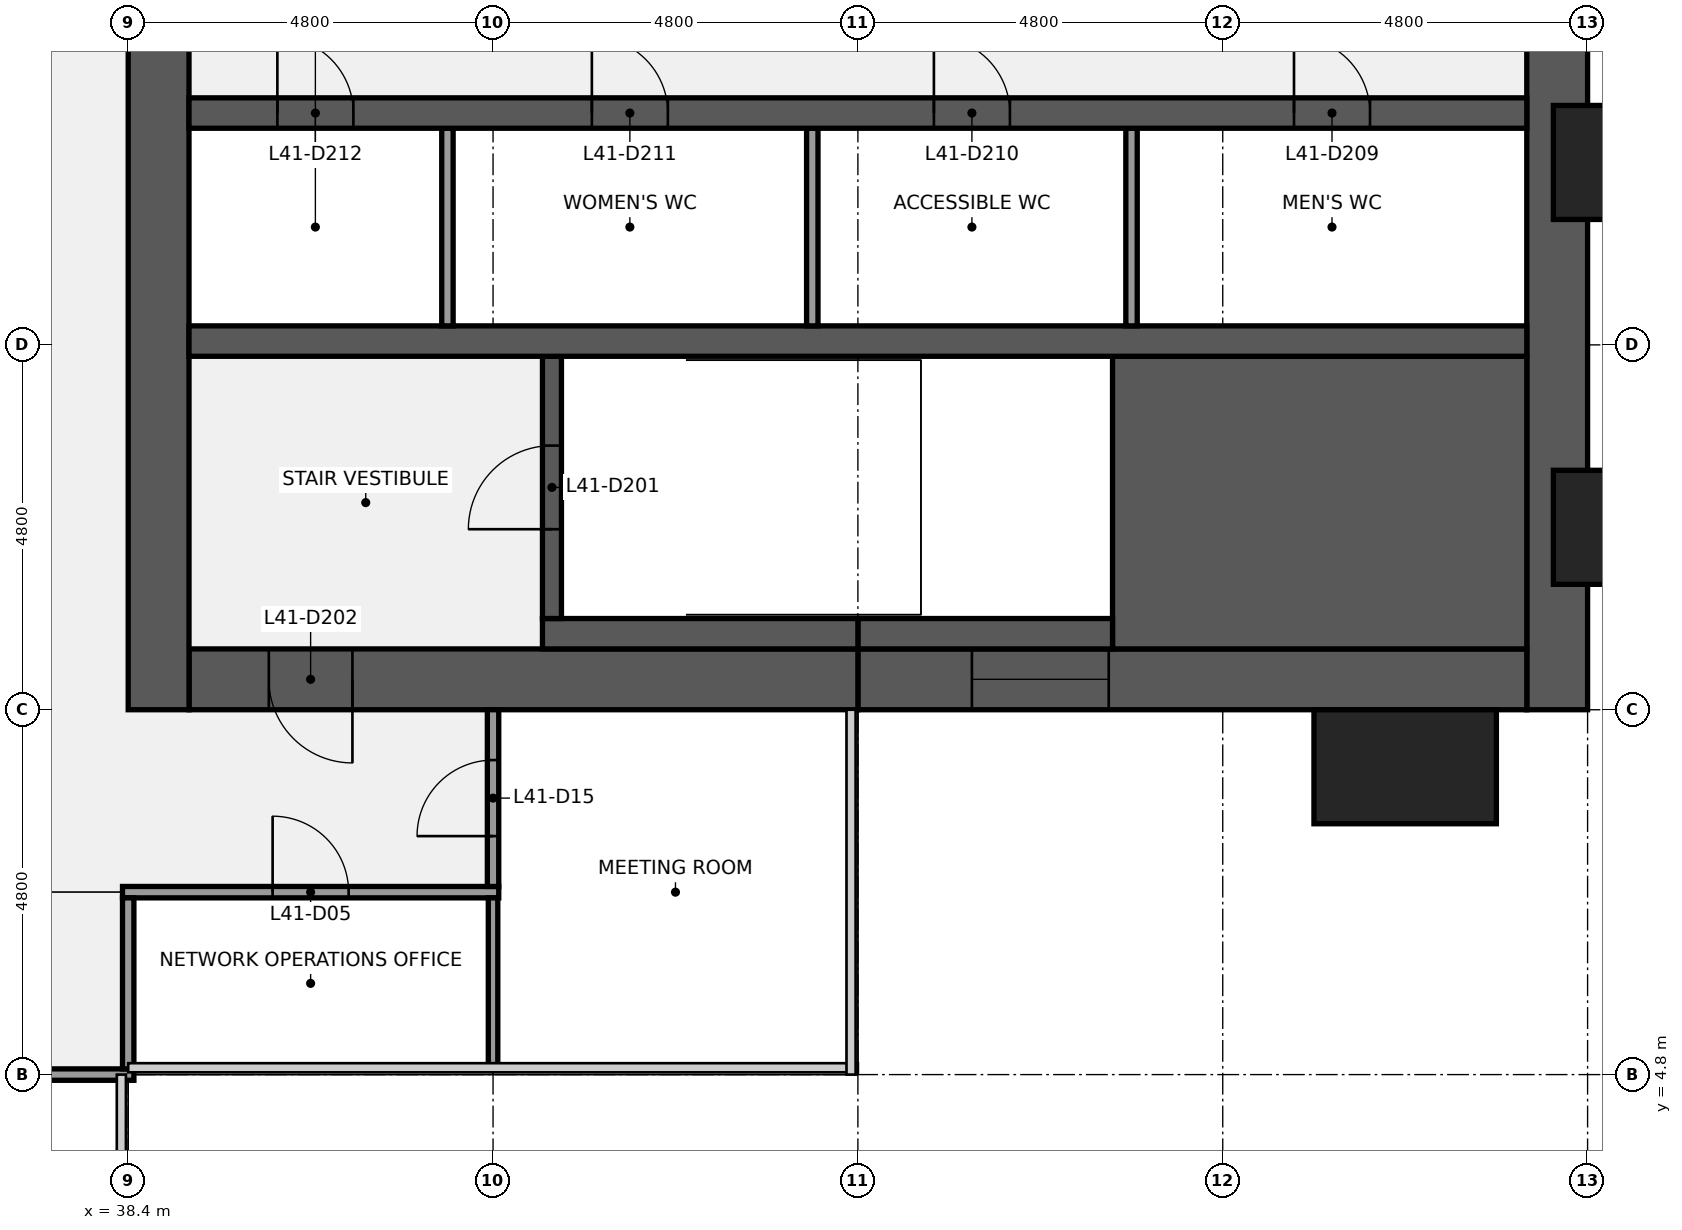
"""IFC4 building model, lengths in metres.
Left out: names, types, materials, properties, quantities, classifications, styles, units other than length and angle.
Written with IfcOpenShell. Run it as: python <this file> out.ifc"""

import sys

from ifc_helpers import new_model, si_unit, direction, frame, frame_2d, origin, origin_2d, place, context, subcontext, project, spatial, rectangle, extrude, element, fill, save


model = new_model("IFC4")
c1 = context("Model", 3, precision=1e-05, world=origin(), true_north=direction((0.0, 1.0)))
c2 = subcontext(c1, "Body", "Model", "MODEL_VIEW")
j1 = project(units=[si_unit("LENGTHUNIT", "METRE"), si_unit("PLANEANGLEUNIT", "RADIAN")], contexts=[c1])
p1 = place(None, origin())
s1 = spatial("IfcSite", under=j1, at=p1, CompositionType="ELEMENT")
p2 = place(p1, origin())
s2 = spatial("IfcBuilding", under=s1, at=p2, CompositionType="ELEMENT")
p3 = place(p2, frame((0.0, 0.0, 193.2)))
s3 = spatial("IfcBuildingStorey", under=s2, at=p3, CompositionType="ELEMENT", Elevation=193.2)
p4 = place(p3, frame((57.2, 38.4, 0.0), z_axis=(0.0, 0.0, 1.0), x_axis=(0.0, -1.0, 0.0)))
e1 = element("IfcWall", 1, at=p4, inside=s3, PredefinedType="SHEAR", context=c2, shape_type="SweptSolid", body=[
    extrude(rectangle(XDim=28.8, YDim=0.8, at=frame_2d((14.4, 0.0))), origin(), (0.0, 0.0, 1.0), 3.84),
])
p5 = place(p4, frame((18.45, 0.0, 0.9)))
e2 = element("IfcOpeningElement", 2, at=p5, cuts=e1, PredefinedType="OPENING", context=c2, shape_type="SweptSolid", body=[
    extrude(rectangle(XDim=1.5, YDim=1.5, at=frame_2d((0.75, 0.75))), frame((0.0, 0.41, 0.0), z_axis=(0.0, -1.0, 0.0), x_axis=(1.0, 0.0, 0.0)), (0.0, 0.0, 1.0), 0.82),
])
p6 = place(p4, frame((8.85, 0.0, 0.9)))
e3 = element("IfcOpeningElement", 3, at=p6, cuts=e1, PredefinedType="OPENING", context=c2, shape_type="SweptSolid", body=[
    extrude(rectangle(XDim=1.5, YDim=1.5, at=frame_2d((0.75, 0.75))), frame((0.0, 0.41, 0.0), z_axis=(0.0, -1.0, 0.0), x_axis=(1.0, 0.0, 0.0)), (0.0, 0.0, 1.0), 0.82),
])
p7 = place(p3, frame((56.8, 10.0, 0.0), z_axis=(0.0, 0.0, 1.0), x_axis=(-1.0, 0.0, 0.0)))
e4 = element("IfcWall", 4, at=p7, inside=s3, PredefinedType="SHEAR", context=c2, shape_type="SweptSolid", body=[
    extrude(rectangle(XDim=8.8, YDim=0.8, at=frame_2d((4.4, 0.0))), origin(), (0.0, 0.0, 1.0), 3.84),
])
p8 = place(p7, frame((5.5, 0.0, 0.9)))
e5 = element("IfcOpeningElement", 5, at=p8, cuts=e4, PredefinedType="OPENING", context=c2, shape_type="SweptSolid", body=[
    extrude(rectangle(XDim=1.8, YDim=1.5, at=frame_2d((0.9, 0.75))), frame((0.0, 0.41, 0.0), z_axis=(0.0, -1.0, 0.0), x_axis=(1.0, 0.0, 0.0)), (0.0, 0.0, 1.0), 0.82),
])
p9 = place(p3, frame((48.0, 10.0, 0.0), z_axis=(0.0, 0.0, 1.0), x_axis=(-1.0, 0.0, 0.0)))
e6 = element("IfcWall", 6, at=p9, inside=s3, PredefinedType="SHEAR", context=c2, shape_type="SweptSolid", body=[
    extrude(rectangle(XDim=8.8, YDim=0.8, at=frame_2d((4.4, 0.0))), origin(), (0.0, 0.0, 1.0), 3.84),
])
p10 = place(p9, frame((6.65, 0.0, 0.0)))
e7 = element("IfcOpeningElement", 7, at=p10, cuts=e6, PredefinedType="OPENING", context=c2, shape_type="SweptSolid", body=[
    extrude(rectangle(XDim=1.1, YDim=2.1, at=frame_2d((0.55, 1.05))), frame((0.0, 0.41, 0.0), z_axis=(0.0, -1.0, 0.0), x_axis=(1.0, 0.0, 0.0)), (0.0, 0.0, 1.0), 0.82),
])
p11 = place(p3, frame((38.8, 9.6, 0.0), z_axis=(0.0, 0.0, 1.0), x_axis=(0.0, 1.0, 0.0)))
e8 = element("IfcWall", 8, at=p11, inside=s3, PredefinedType="SHEAR", context=c2, shape_type="SweptSolid", body=[
    extrude(rectangle(XDim=28.8, YDim=0.8, at=frame_2d((14.4, 0.0))), origin(), (0.0, 0.0, 1.0), 3.84),
])
p12 = place(p11, frame((8.7, 0.0, 0.0)))
e9 = element("IfcOpeningElement", 9, at=p12, cuts=e8, PredefinedType="OPENING", context=c2, shape_type="SweptSolid", body=[
    extrude(rectangle(XDim=1.8, YDim=2.1, at=frame_2d((0.9, 1.05))), frame((0.0, 0.41, 0.0), z_axis=(0.0, -1.0, 0.0), x_axis=(1.0, 0.0, 0.0)), (0.0, 0.0, 1.0), 0.82),
])
p13 = place(p11, frame((18.3, 0.0, 0.0)))
e10 = element("IfcOpeningElement", 10, at=p13, cuts=e8, PredefinedType="OPENING", context=c2, shape_type="SweptSolid", body=[
    extrude(rectangle(XDim=1.8, YDim=2.1, at=frame_2d((0.9, 1.05))), frame((0.0, 0.41, 0.0), z_axis=(0.0, -1.0, 0.0), x_axis=(1.0, 0.0, 0.0)), (0.0, 0.0, 1.0), 0.82),
])
p14 = place(p3, frame((51.35, 12.325, 0.0), z_axis=(0.0, 0.0, 1.0), x_axis=(1.0, 0.0, 0.0)))
e11 = element("IfcWall", 11, at=p14, inside=s3, PredefinedType="SHEAR", context=c2, shape_type="SweptSolid", body=[
    extrude(rectangle(XDim=5.45, YDim=3.85, at=frame_2d((2.725, 0.0))), origin(), (0.0, 0.0, 1.0), 3.84),
])
p15 = place(p3, frame((48.0, 10.6, 0.0), z_axis=(0.0, 0.0, 1.0), x_axis=(1.0, 0.0, 0.0)))
e12 = element("IfcWall", 12, at=p15, inside=s3, PredefinedType="SHEAR", context=c2, shape_type="SweptSolid", body=[
    extrude(rectangle(XDim=3.35, YDim=0.4, at=frame_2d((1.675, 0.0))), origin(), (0.0, 0.0, 1.0), 3.84),
])
p16 = place(p3, frame((43.85, 10.6, 0.0), z_axis=(0.0, 0.0, 1.0), x_axis=(1.0, 0.0, 0.0)))
e13 = element("IfcWall", 13, at=p16, inside=s3, PredefinedType="SHEAR", context=c2, shape_type="SweptSolid", body=[
    extrude(rectangle(XDim=4.15, YDim=0.4, at=frame_2d((2.075, 0.0))), origin(), (0.0, 0.0, 1.0), 3.84),
])
p17 = place(p3, frame((43.975, 10.8, 0.0), z_axis=(0.0, 0.0, 1.0), x_axis=(0.0, 1.0, 0.0)))
e14 = element("IfcWall", 14, at=p17, inside=s3, PredefinedType="SHEAR", context=c2, shape_type="SweptSolid", body=[
    extrude(rectangle(XDim=3.45, YDim=0.25, at=frame_2d((1.725, 0.0))), origin(), (0.0, 0.0, 1.0), 3.84),
])
p18 = place(p17, frame((1.175, 0.0, 0.0)))
e15 = element("IfcOpeningElement", 15, at=p18, cuts=e14, PredefinedType="OPENING", context=c2, shape_type="SweptSolid", body=[
    extrude(rectangle(XDim=1.1, YDim=2.1, at=frame_2d((0.55, 1.05))), frame((0.0, 0.135, 0.0), z_axis=(0.0, -1.0, 0.0), x_axis=(1.0, 0.0, 0.0)), (0.0, 0.0, 1.0), 0.27),
])
p19 = place(p3, frame((39.2, 14.45, 0.0), z_axis=(0.0, 0.0, 1.0), x_axis=(1.0, 0.0, 0.0)))
e16 = element("IfcWall", 16, at=p19, inside=s3, PredefinedType="SHEAR", context=c2, shape_type="SweptSolid", body=[
    extrude(rectangle(XDim=17.6, YDim=0.4, at=frame_2d((8.8, 0.0))), origin(), (0.0, 0.0, 1.0), 3.84),
])
for number, where, z_axis, x_axis in (
    (17, (51.6, 14.65, 0.0), (0.0, 0.0, 1.0), (0.0, 1.0, 0.0)),
    (18, (47.4, 14.65, 0.0), (0.0, 0.0, 1.0), (0.0, 1.0, 0.0)),
    (19, (42.6, 14.65, 0.0), (0.0, 0.0, 1.0), (0.0, 1.0, 0.0)),
):
    element("IfcWall", number, at=place(p3, frame(where, z_axis=z_axis, x_axis=x_axis)), inside=s3, PredefinedType="PARTITIONING", context=c2, shape_type="SweptSolid", body=[
        extrude(rectangle(XDim=2.6, YDim=0.15, at=frame_2d((1.3, 0.0))), origin(), (0.0, 0.0, 1.0), 3.84),
    ])
p20 = place(p3, frame((39.2, 17.45, 0.0), z_axis=(0.0, 0.0, 1.0), x_axis=(1.0, 0.0, 0.0)))
e20 = element("IfcWall", 20, at=p20, inside=s3, PredefinedType="SHEAR", context=c2, shape_type="SweptSolid", body=[
    extrude(rectangle(XDim=17.6, YDim=0.4, at=frame_2d((8.8, 0.0))), origin(), (0.0, 0.0, 1.0), 3.84),
])
p21 = place(p20, frame((14.538, 0.0, 0.0)))
e21 = element("IfcOpeningElement", 21, at=p21, cuts=e20, PredefinedType="OPENING", context=c2, shape_type="SweptSolid", body=[
    extrude(rectangle(XDim=1.0, YDim=2.1, at=frame_2d((0.5, 1.05))), frame((0.0, 0.21, 0.0), z_axis=(0.0, -1.0, 0.0), x_axis=(1.0, 0.0, 0.0)), (0.0, 0.0, 1.0), 0.42),
])
p22 = place(p20, frame((9.8, 0.0, 0.0)))
e22 = element("IfcOpeningElement", 22, at=p22, cuts=e20, PredefinedType="OPENING", context=c2, shape_type="SweptSolid", body=[
    extrude(rectangle(XDim=1.0, YDim=2.1, at=frame_2d((0.5, 1.05))), frame((0.0, 0.21, 0.0), z_axis=(0.0, -1.0, 0.0), x_axis=(1.0, 0.0, 0.0)), (0.0, 0.0, 1.0), 0.42),
])
p23 = place(p20, frame((5.3, 0.0, 0.0)))
e23 = element("IfcOpeningElement", 23, at=p23, cuts=e20, PredefinedType="OPENING", context=c2, shape_type="SweptSolid", body=[
    extrude(rectangle(XDim=1.0, YDim=2.1, at=frame_2d((0.5, 1.05))), frame((0.0, 0.21, 0.0), z_axis=(0.0, -1.0, 0.0), x_axis=(1.0, 0.0, 0.0)), (0.0, 0.0, 1.0), 0.42),
])
p24 = place(p20, frame((1.163, 0.0, 0.0)))
e24 = element("IfcOpeningElement", 24, at=p24, cuts=e20, PredefinedType="OPENING", context=c2, shape_type="SweptSolid", body=[
    extrude(rectangle(XDim=1.0, YDim=2.1, at=frame_2d((0.5, 1.05))), frame((0.0, 0.21, 0.0), z_axis=(0.0, -1.0, 0.0), x_axis=(1.0, 0.0, 0.0)), (0.0, 0.0, 1.0), 0.42),
])
p25 = place(p3, frame((19.125, 4.8, 0.0), z_axis=(0.0, 0.0, 1.0), x_axis=(1.0, 0.0, 0.0)))
e25 = element("IfcWall", 25, at=p25, inside=s3, PredefinedType="PARTITIONING", context=c2, shape_type="SweptSolid", body=[
    extrude(rectangle(XDim=19.35, YDim=0.15, at=frame_2d((9.675, 0.0))), origin(), (0.0, 0.0, 1.0), 2.849),
])
p26 = place(p25, frame((9.175, 0.0, 0.0)))
e26 = element("IfcOpeningElement", 26, at=p26, cuts=e25, PredefinedType="OPENING", context=c2, shape_type="SweptSolid", body=[
    extrude(rectangle(XDim=1.0, YDim=2.1, at=frame_2d((0.5, 1.05))), frame((0.0, 0.085, 0.0), z_axis=(0.0, -1.0, 0.0), x_axis=(1.0, 0.0, 0.0)), (0.0, 0.0, 1.0), 0.17),
])
p27 = place(p3, frame((38.325, 7.2, 0.0), z_axis=(0.0, 0.0, 1.0), x_axis=(1.0, 0.0, 0.0)))
e27 = element("IfcWall", 27, at=p27, inside=s3, PredefinedType="PARTITIONING", context=c2, shape_type="SweptSolid", body=[
    extrude(rectangle(XDim=4.95, YDim=0.15, at=frame_2d((2.475, 0.0))), origin(), (0.0, 0.0, 1.0), 2.849),
])
p28 = place(p27, frame((1.975, 0.0, 0.0)))
e28 = element("IfcOpeningElement", 28, at=p28, cuts=e27, PredefinedType="OPENING", context=c2, shape_type="SweptSolid", body=[
    extrude(rectangle(XDim=1.0, YDim=2.1, at=frame_2d((0.5, 1.05))), frame((0.0, 0.085, 0.0), z_axis=(0.0, -1.0, 0.0), x_axis=(1.0, 0.0, 0.0)), (0.0, 0.0, 1.0), 0.17),
])
p29 = place(p3, frame((38.4, 4.875, 0.0), z_axis=(0.0, 0.0, 1.0), x_axis=(0.0, 1.0, 0.0)))
e29 = element("IfcWall", 29, at=p29, inside=s3, PredefinedType="PARTITIONING", context=c2, shape_type="SweptSolid", body=[
    extrude(rectangle(XDim=2.25, YDim=0.15, at=frame_2d((1.125, 0.0))), origin(), (0.0, 0.0, 1.0), 2.849),
])
p30 = place(p3, frame((43.2, 4.9, 0.0), z_axis=(0.0, 0.0, 1.0), x_axis=(0.0, 1.0, 0.0)))
e30 = element("IfcWall", 30, at=p30, inside=s3, PredefinedType="PARTITIONING", context=c2, shape_type="SweptSolid", body=[
    extrude(rectangle(XDim=2.225, YDim=0.125, at=frame_2d((1.113, 0.0))), origin(), (0.0, 0.0, 1.0), 2.849),
])
p31 = place(p3, frame((43.2, 7.275, 0.0), z_axis=(0.0, 0.0, 1.0), x_axis=(0.0, 1.0, 0.0)))
e31 = element("IfcWall", 31, at=p31, inside=s3, PredefinedType="PARTITIONING", context=c2, shape_type="SweptSolid", body=[
    extrude(rectangle(XDim=2.325, YDim=0.15, at=frame_2d((1.163, 0.0))), origin(), (0.0, 0.0, 1.0), 2.849),
])
p32 = place(p31, frame((0.663, 0.0, 0.0)))
e32 = element("IfcOpeningElement", 32, at=p32, cuts=e31, PredefinedType="OPENING", context=c2, shape_type="SweptSolid", body=[
    extrude(rectangle(XDim=1.0, YDim=2.1, at=frame_2d((0.5, 1.05))), frame((0.0, 0.085, 0.0), z_axis=(0.0, -1.0, 0.0), x_axis=(1.0, 0.0, 0.0)), (0.0, 0.0, 1.0), 0.17),
])
for number, where, z_axis, x_axis in (
    (33, (55.2, 8.85, 0.0), (0.0, 0.0, 1.0), (1.0, 0.0, 0.0)),
    (34, (58.35, 12.0, 0.0), (0.0, 0.0, 1.0), (0.0, 1.0, 0.0)),
    (35, (58.35, 16.8, 0.0), (0.0, 0.0, 1.0), (0.0, 1.0, 0.0)),
):
    element("IfcColumn", number, at=place(p3, frame(where, z_axis=z_axis, x_axis=x_axis)), inside=s3, PredefinedType="PILASTER", context=c2, shape_type="SweptSolid", body=[
        extrude(rectangle(XDim=2.4, YDim=1.5, at=origin_2d()), origin(), (0.0, 0.0, 1.0), 4.0),
    ])
p33 = place(p18, origin())
e36 = element("IfcDoor", 36, at=p33, inside=s3, OperationType="SINGLE_SWING_LEFT", PredefinedType="DOOR", context=c2, shape_type="SweptSolid", body=[
    extrude(rectangle(XDim=1.1, YDim=2.1, at=frame_2d((0.55, 1.05))), frame((0.0, 0.025, 0.0), z_axis=(0.0, -1.0, 0.0), x_axis=(1.0, 0.0, 0.0)), (0.0, 0.0, 1.0), 0.05),
])
fill(e15, e36)
p34 = place(p10, origin())
e37 = element("IfcDoor", 37, at=p34, inside=s3, OperationType="SINGLE_SWING_LEFT", PredefinedType="DOOR", context=c2, shape_type="SweptSolid", body=[
    extrude(rectangle(XDim=1.1, YDim=2.1, at=frame_2d((0.55, 1.05))), frame((0.0, 0.025, 0.0), z_axis=(0.0, -1.0, 0.0), x_axis=(1.0, 0.0, 0.0)), (0.0, 0.0, 1.0), 0.05),
])
fill(e7, e37)
p35 = place(p21, origin())
e38 = element("IfcDoor", 38, at=p35, inside=s3, OperationType="SINGLE_SWING_LEFT", PredefinedType="DOOR", context=c2, shape_type="SweptSolid", body=[
    extrude(rectangle(XDim=1.0, YDim=2.1, at=frame_2d((0.5, 1.05))), frame((0.0, 0.025, 0.0), z_axis=(0.0, -1.0, 0.0), x_axis=(1.0, 0.0, 0.0)), (0.0, 0.0, 1.0), 0.05),
])
fill(e21, e38)
p36 = place(p22, origin())
e39 = element("IfcDoor", 39, at=p36, inside=s3, OperationType="SINGLE_SWING_LEFT", PredefinedType="DOOR", context=c2, shape_type="SweptSolid", body=[
    extrude(rectangle(XDim=1.0, YDim=2.1, at=frame_2d((0.5, 1.05))), frame((0.0, 0.025, 0.0), z_axis=(0.0, -1.0, 0.0), x_axis=(1.0, 0.0, 0.0)), (0.0, 0.0, 1.0), 0.05),
])
fill(e22, e39)
p37 = place(p23, origin())
e40 = element("IfcDoor", 40, at=p37, inside=s3, OperationType="SINGLE_SWING_LEFT", PredefinedType="DOOR", context=c2, shape_type="SweptSolid", body=[
    extrude(rectangle(XDim=1.0, YDim=2.1, at=frame_2d((0.5, 1.05))), frame((0.0, 0.025, 0.0), z_axis=(0.0, -1.0, 0.0), x_axis=(1.0, 0.0, 0.0)), (0.0, 0.0, 1.0), 0.05),
])
fill(e23, e40)
p38 = place(p24, origin())
e41 = element("IfcDoor", 41, at=p38, inside=s3, OperationType="SINGLE_SWING_LEFT", PredefinedType="DOOR", context=c2, shape_type="SweptSolid", body=[
    extrude(rectangle(XDim=1.0, YDim=2.1, at=frame_2d((0.5, 1.05))), frame((0.0, 0.025, 0.0), z_axis=(0.0, -1.0, 0.0), x_axis=(1.0, 0.0, 0.0)), (0.0, 0.0, 1.0), 0.05),
])
fill(e24, e41)
p39 = place(p8, origin())
e42 = element("IfcWindow", 42, at=p39, inside=s3, PartitioningType="SINGLE_PANEL", PredefinedType="WINDOW", context=c2, shape_type="SweptSolid", body=[
    extrude(rectangle(XDim=1.8, YDim=1.5, at=frame_2d((0.9, 0.75))), frame((0.0, 0.03, 0.0), z_axis=(0.0, -1.0, 0.0), x_axis=(1.0, 0.0, 0.0)), (0.0, 0.0, 1.0), 0.06),
])
fill(e5, e42)
p40 = place(p28, origin())
e43 = element("IfcDoor", 43, at=p40, inside=s3, OperationType="SINGLE_SWING_LEFT", PredefinedType="DOOR", context=c2, shape_type="SweptSolid", body=[
    extrude(rectangle(XDim=1.0, YDim=2.1, at=frame_2d((0.5, 1.05))), frame((0.0, 0.025, 0.0), z_axis=(0.0, -1.0, 0.0), x_axis=(1.0, 0.0, 0.0)), (0.0, 0.0, 1.0), 0.05),
])
fill(e28, e43)
p41 = place(p32, origin())
e44 = element("IfcDoor", 44, at=p41, inside=s3, OperationType="SINGLE_SWING_LEFT", PredefinedType="DOOR", context=c2, shape_type="SweptSolid", body=[
    extrude(rectangle(XDim=1.0, YDim=2.1, at=frame_2d((0.5, 1.05))), frame((0.0, 0.025, 0.0), z_axis=(0.0, -1.0, 0.0), x_axis=(1.0, 0.0, 0.0)), (0.0, 0.0, 1.0), 0.05),
])
fill(e32, e44)
save(model, sys.argv[1])
